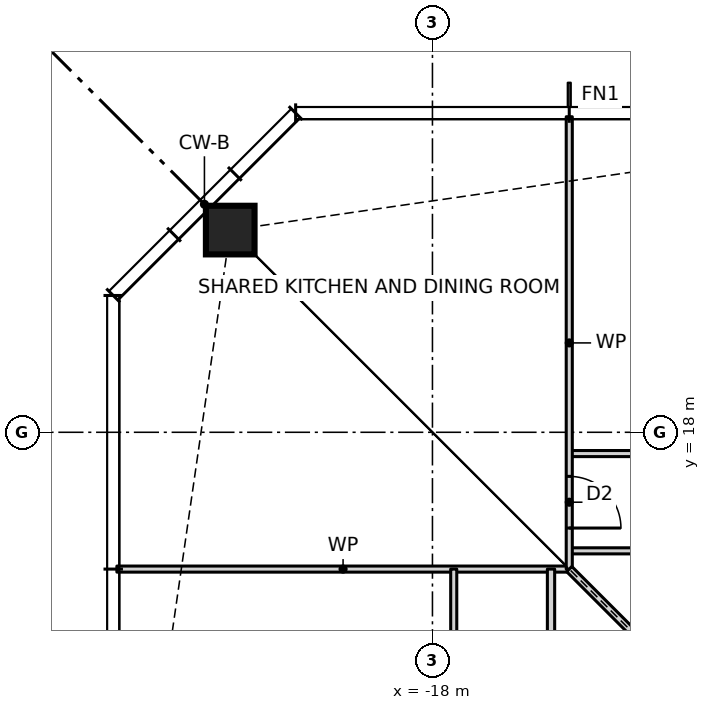
"""IFC4 building model, lengths in metres.
Left out: names, types, materials, properties, quantities, classifications, styles, units other than length and angle.
Written with IfcOpenShell. Run it as: python <this file> out.ifc"""

import sys

from ifc_helpers import new_model, si_unit, direction, frame, frame_2d, origin, origin_2d, place, context, subcontext, project, spatial, rectangle, hollow_rectangle, extrude, element, fill, save


model = new_model("IFC4")
c1 = context("Model", 3, precision=1e-05, world=origin(), true_north=direction((0.0, 1.0)))
c2 = subcontext(c1, "Body", "Model", "MODEL_VIEW")
j1 = project(units=[si_unit("LENGTHUNIT", "METRE"), si_unit("PLANEANGLEUNIT", "RADIAN")], contexts=[c1])
p1 = place(None, origin())
s1 = spatial("IfcSite", under=j1, at=p1, CompositionType="ELEMENT")
p2 = place(p1, origin())
s2 = spatial("IfcBuilding", under=s1, at=p2, CompositionType="ELEMENT")
p3 = place(p2, frame((0.0, 0.0, 57.0)))
s3 = spatial("IfcBuildingStorey", under=s2, at=p3, CompositionType="ELEMENT", Elevation=57.0)
p4 = place(p3, frame((-21.326, 21.326, 0.0), z_axis=(0.0, 0.0, 1.0), x_axis=(1.0, 0.0, 0.0)))
e1 = element("IfcColumn", 1, at=p4, inside=s3, PredefinedType="COLUMN", context=c2, shape_type="SweptSolid", body=[
    extrude(hollow_rectangle(XDim=0.8, YDim=0.8, WallThickness=0.09, at=origin_2d()), origin(), (0.0, 0.0, 1.0), 3.5),
])
p5 = place(p3, frame((-23.19, 15.75, 0.0), z_axis=(0.0, 0.0, 1.0), x_axis=(1.0, 0.0, 0.0)))
e2 = element("IfcWall", 2, at=p5, inside=s3, PredefinedType="PARTITIONING", context=c2, shape_type="SweptSolid", body=[
    extrude(rectangle(XDim=7.44, YDim=0.1, at=frame_2d((3.72, 0.0))), origin(), (0.0, 0.0, 1.0), 3.27),
])
p6 = place(p3, frame((-15.75, 16.05, 0.0), z_axis=(0.0, 0.0, 1.0), x_axis=(1.0, 0.0, 0.0)))
e3 = element("IfcWall", 3, at=p6, inside=s3, PredefinedType="PARTITIONING", context=c2, shape_type="SweptSolid", body=[
    extrude(rectangle(XDim=11.31, YDim=0.1, at=frame_2d((5.655, 0.0))), origin(), (0.0, 0.0, 1.0), 3.27),
])
p7 = place(p6, frame((5.23, 0.0, 0.0)))
e4 = element("IfcOpeningElement", 4, at=p7, cuts=e3, PredefinedType="OPENING", context=c2, shape_type="SweptSolid", body=[
    extrude(rectangle(XDim=0.85, YDim=2.1, at=frame_2d((0.425, 1.05))), frame((0.0, 0.06, 0.0), z_axis=(0.0, -1.0, 0.0), x_axis=(1.0, 0.0, 0.0)), (0.0, 0.0, 1.0), 0.12),
])
p8 = place(p3, frame((-15.75, 17.65, 0.0), z_axis=(0.0, 0.0, 1.0), x_axis=(1.0, 0.0, 0.0)))
e5 = element("IfcWall", 5, at=p8, inside=s3, PredefinedType="PARTITIONING", context=c2, shape_type="SweptSolid", body=[
    extrude(rectangle(XDim=27.0, YDim=0.1, at=frame_2d((13.5, 0.0))), origin(), (0.0, 0.0, 1.0), 3.27),
])
p9 = place(p8, frame((24.3, 0.0, 0.0)))
e6 = element("IfcOpeningElement", 6, at=p9, cuts=e5, PredefinedType="OPENING", context=c2, shape_type="SweptSolid", body=[
    extrude(rectangle(XDim=0.9, YDim=2.1, at=frame_2d((0.45, 1.05))), frame((0.0, 0.06, 0.0), z_axis=(0.0, -1.0, 0.0), x_axis=(1.0, 0.0, 0.0)), (0.0, 0.0, 1.0), 0.12),
])
p10 = place(p8, frame((19.8, 0.0, 0.0)))
e7 = element("IfcOpeningElement", 7, at=p10, cuts=e5, PredefinedType="OPENING", context=c2, shape_type="SweptSolid", body=[
    extrude(rectangle(XDim=0.9, YDim=2.1, at=frame_2d((0.45, 1.05))), frame((0.0, 0.06, 0.0), z_axis=(0.0, -1.0, 0.0), x_axis=(1.0, 0.0, 0.0)), (0.0, 0.0, 1.0), 0.12),
])
p11 = place(p8, frame((15.3, 0.0, 0.0)))
e8 = element("IfcOpeningElement", 8, at=p11, cuts=e5, PredefinedType="OPENING", context=c2, shape_type="SweptSolid", body=[
    extrude(rectangle(XDim=0.9, YDim=2.1, at=frame_2d((0.45, 1.05))), frame((0.0, 0.06, 0.0), z_axis=(0.0, -1.0, 0.0), x_axis=(1.0, 0.0, 0.0)), (0.0, 0.0, 1.0), 0.12),
])
p12 = place(p8, frame((10.8, 0.0, 0.0)))
e9 = element("IfcOpeningElement", 9, at=p12, cuts=e5, PredefinedType="OPENING", context=c2, shape_type="SweptSolid", body=[
    extrude(rectangle(XDim=0.9, YDim=2.1, at=frame_2d((0.45, 1.05))), frame((0.0, 0.06, 0.0), z_axis=(0.0, -1.0, 0.0), x_axis=(1.0, 0.0, 0.0)), (0.0, 0.0, 1.0), 0.12),
])
p13 = place(p8, frame((6.3, 0.0, 0.0)))
e10 = element("IfcOpeningElement", 10, at=p13, cuts=e5, PredefinedType="OPENING", context=c2, shape_type="SweptSolid", body=[
    extrude(rectangle(XDim=0.9, YDim=2.1, at=frame_2d((0.45, 1.05))), frame((0.0, 0.06, 0.0), z_axis=(0.0, -1.0, 0.0), x_axis=(1.0, 0.0, 0.0)), (0.0, 0.0, 1.0), 0.12),
])
p14 = place(p8, frame((1.8, 0.0, 0.0)))
e11 = element("IfcOpeningElement", 11, at=p14, cuts=e5, PredefinedType="OPENING", context=c2, shape_type="SweptSolid", body=[
    extrude(rectangle(XDim=0.9, YDim=2.1, at=frame_2d((0.45, 1.05))), frame((0.0, 0.06, 0.0), z_axis=(0.0, -1.0, 0.0), x_axis=(1.0, 0.0, 0.0)), (0.0, 0.0, 1.0), 0.12),
])
p15 = place(p3, frame((-15.75, 15.75, 0.0), z_axis=(0.0, 0.0, 1.0), x_axis=(0.0, 1.0, 0.0)))
e12 = element("IfcWall", 12, at=p15, inside=s3, PredefinedType="PARTITIONING", context=c2, shape_type="SweptSolid", body=[
    extrude(rectangle(XDim=7.44, YDim=0.1, at=frame_2d((3.72, 0.0))), origin(), (0.0, 0.0, 1.0), 3.27),
])
p16 = place(p15, frame((0.675, 0.0, 0.0)))
e13 = element("IfcOpeningElement", 13, at=p16, cuts=e12, PredefinedType="OPENING", context=c2, shape_type="SweptSolid", body=[
    extrude(rectangle(XDim=0.85, YDim=2.1, at=frame_2d((0.425, 1.05))), frame((0.0, 0.06, 0.0), z_axis=(0.0, -1.0, 0.0), x_axis=(1.0, 0.0, 0.0)), (0.0, 0.0, 1.0), 0.12),
])
p17 = place(p3, frame((-16.05, 12.15, 0.0), z_axis=(0.0, 0.0, 1.0), x_axis=(0.0, 1.0, 0.0)))
e14 = element("IfcWall", 14, at=p17, inside=s3, PredefinedType="PARTITIONING", context=c2, shape_type="SweptSolid", body=[
    extrude(rectangle(XDim=3.6, YDim=0.12, at=frame_2d((1.8, 0.0))), origin(), (0.0, 0.0, 1.0), 3.27),
])
p18 = place(p3, frame((-17.65, -15.75, 0.0), z_axis=(0.0, 0.0, 1.0), x_axis=(0.0, 1.0, 0.0)))
e15 = element("IfcWall", 15, at=p18, inside=s3, PredefinedType="PARTITIONING", context=c2, shape_type="SweptSolid", body=[
    extrude(rectangle(XDim=31.5, YDim=0.1, at=frame_2d((15.75, 0.0))), origin(), (0.0, 0.0, 1.0), 3.27),
])
p19 = place(p18, frame((28.8, 0.0, 0.0)))
e16 = element("IfcOpeningElement", 16, at=p19, cuts=e15, PredefinedType="OPENING", context=c2, shape_type="SweptSolid", body=[
    extrude(rectangle(XDim=0.9, YDim=2.1, at=frame_2d((0.45, 1.05))), frame((0.0, 0.06, 0.0), z_axis=(0.0, -1.0, 0.0), x_axis=(1.0, 0.0, 0.0)), (0.0, 0.0, 1.0), 0.12),
])
p20 = place(p18, frame((24.3, 0.0, 0.0)))
e17 = element("IfcOpeningElement", 17, at=p20, cuts=e15, PredefinedType="OPENING", context=c2, shape_type="SweptSolid", body=[
    extrude(rectangle(XDim=0.9, YDim=2.1, at=frame_2d((0.45, 1.05))), frame((0.0, 0.06, 0.0), z_axis=(0.0, -1.0, 0.0), x_axis=(1.0, 0.0, 0.0)), (0.0, 0.0, 1.0), 0.12),
])
p21 = place(p18, frame((19.8, 0.0, 0.0)))
e18 = element("IfcOpeningElement", 18, at=p21, cuts=e15, PredefinedType="OPENING", context=c2, shape_type="SweptSolid", body=[
    extrude(rectangle(XDim=0.9, YDim=2.1, at=frame_2d((0.45, 1.05))), frame((0.0, 0.06, 0.0), z_axis=(0.0, -1.0, 0.0), x_axis=(1.0, 0.0, 0.0)), (0.0, 0.0, 1.0), 0.12),
])
p22 = place(p18, frame((15.3, 0.0, 0.0)))
e19 = element("IfcOpeningElement", 19, at=p22, cuts=e15, PredefinedType="OPENING", context=c2, shape_type="SweptSolid", body=[
    extrude(rectangle(XDim=0.9, YDim=2.1, at=frame_2d((0.45, 1.05))), frame((0.0, 0.06, 0.0), z_axis=(0.0, -1.0, 0.0), x_axis=(1.0, 0.0, 0.0)), (0.0, 0.0, 1.0), 0.12),
])
p23 = place(p18, frame((10.8, 0.0, 0.0)))
e20 = element("IfcOpeningElement", 20, at=p23, cuts=e15, PredefinedType="OPENING", context=c2, shape_type="SweptSolid", body=[
    extrude(rectangle(XDim=0.9, YDim=2.1, at=frame_2d((0.45, 1.05))), frame((0.0, 0.06, 0.0), z_axis=(0.0, -1.0, 0.0), x_axis=(1.0, 0.0, 0.0)), (0.0, 0.0, 1.0), 0.12),
])
p24 = place(p18, frame((6.3, 0.0, 0.0)))
e21 = element("IfcOpeningElement", 21, at=p24, cuts=e15, PredefinedType="OPENING", context=c2, shape_type="SweptSolid", body=[
    extrude(rectangle(XDim=0.9, YDim=2.1, at=frame_2d((0.45, 1.05))), frame((0.0, 0.06, 0.0), z_axis=(0.0, -1.0, 0.0), x_axis=(1.0, 0.0, 0.0)), (0.0, 0.0, 1.0), 0.12),
])
p25 = place(p18, frame((1.8, 0.0, 0.0)))
e22 = element("IfcOpeningElement", 22, at=p25, cuts=e15, PredefinedType="OPENING", context=c2, shape_type="SweptSolid", body=[
    extrude(rectangle(XDim=0.9, YDim=2.1, at=frame_2d((0.45, 1.05))), frame((0.0, 0.06, 0.0), z_axis=(0.0, -1.0, 0.0), x_axis=(1.0, 0.0, 0.0)), (0.0, 0.0, 1.0), 0.12),
])
p26 = place(p3, frame((-11.6, 11.6, 0.0), z_axis=(0.0, 0.0, 1.0), x_axis=(-0.707106781187, 0.707106781187, 0.0)))
e23 = element("IfcWall", 23, at=p26, inside=s3, PredefinedType="PARTITIONING", context=c2, shape_type="SweptSolid", body=[
    extrude(rectangle(XDim=5.869, YDim=0.12, at=frame_2d((2.935, 0.0))), origin(), (0.0, 0.0, 1.0), 2.343),
])
p27 = place(p16, frame((0.85, 0.0, 0.0), z_axis=(0.0, 0.0, 1.0), x_axis=(-1.0, 0.0, 0.0)))
e24 = element("IfcDoor", 24, at=p27, inside=s3, OperationType="SINGLE_SWING_RIGHT", PredefinedType="DOOR", context=c2, shape_type="SweptSolid", body=[
    extrude(rectangle(XDim=0.85, YDim=2.1, at=frame_2d((0.425, 1.05))), frame((0.0, 0.025, 0.0), z_axis=(0.0, -1.0, 0.0), x_axis=(1.0, 0.0, 0.0)), (0.0, 0.0, 1.0), 0.05),
])
fill(e13, e24)
save(model, sys.argv[1])
